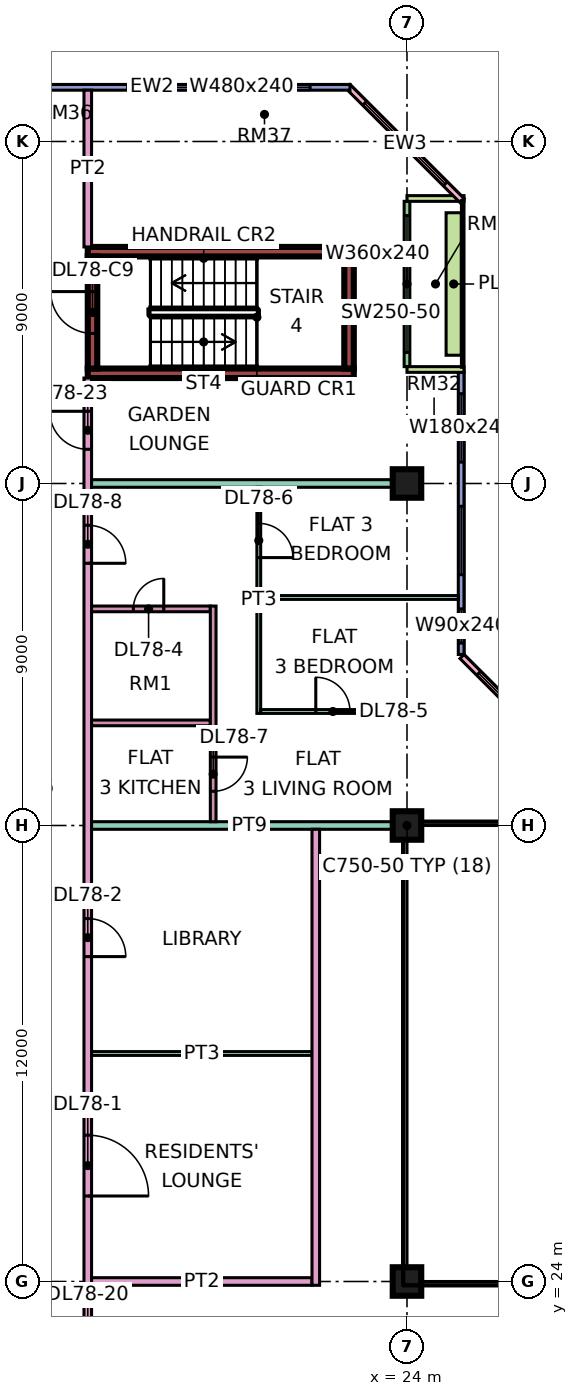
"""IFC4 building model, lengths in metres.
Left out: names, types, materials, properties, quantities, classifications, styles, units other than length and angle.
Written with IfcOpenShell. Run it as: python <this file> out.ifc"""

import sys

from ifc_helpers import new_model, si_unit, direction, frame, frame_2d, origin, origin_2d, place, context, subcontext, project, spatial, rectangle, extrude, element, fill, save


model = new_model("IFC4")
c1 = context("Model", 3, precision=1e-05, world=origin(), true_north=direction((0.0, 1.0)))
c2 = subcontext(c1, "Body", "Model", "MODEL_VIEW")
j1 = project(units=[si_unit("LENGTHUNIT", "METRE"), si_unit("PLANEANGLEUNIT", "RADIAN")], contexts=[c1])
p1 = place(None, origin())
s1 = spatial("IfcSite", under=j1, at=p1, CompositionType="ELEMENT")
p2 = place(p1, origin())
s2 = spatial("IfcBuilding", under=s1, at=p2, CompositionType="ELEMENT")
p3 = place(p2, frame((0.0, 0.0, 338.9)))
s3 = spatial("IfcBuildingStorey", under=s2, at=p3, CompositionType="ELEMENT", Elevation=338.9)
for number, where, z_axis, x_axis in (
    (1, (24.0, 24.0, 0.0), (0.0, 0.0, 1.0), (1.0, 0.0, 0.0)),
    (2, (24.0, 36.0, 0.0), (0.0, 0.0, 1.0), (1.0, 0.0, 0.0)),
    (3, (24.0, 45.0, 0.0), (0.0, 0.0, 1.0), (1.0, 0.0, 0.0)),
):
    element("IfcColumn", number, at=place(p3, frame(where, z_axis=z_axis, x_axis=x_axis)), inside=s3, PredefinedType="COLUMN", context=c2, shape_type="SweptSolid", body=[
        extrude(rectangle(XDim=0.75, YDim=0.75, at=origin_2d()), origin(), (0.0, 0.0, 1.0), 3.75),
    ])
for number, where, z_axis, x_axis in (
    (4, (15.6, 47.9, 0.0), (0.0, 0.0, 1.0), (1.0, 0.0, 0.0)),
    (5, (15.6, 51.1, 0.0), (0.0, 0.0, 1.0), (1.0, 0.0, 0.0)),
):
    element("IfcWall", number, at=place(p3, frame(where, z_axis=z_axis, x_axis=x_axis)), inside=s3, PredefinedType="SHEAR", context=c2, shape_type="SweptSolid", body=[
        extrude(rectangle(XDim=7.0, YDim=0.25, at=frame_2d((3.5, 0.0))), origin(), (0.0, 0.0, 1.0), 3.75),
    ])
p4 = place(p3, frame((15.725, 48.025, 0.0), z_axis=(0.0, 0.0, 1.0), x_axis=(0.0, 1.0, 0.0)))
e6 = element("IfcWall", 6, at=p4, inside=s3, PredefinedType="SHEAR", context=c2, shape_type="SweptSolid", body=[
    extrude(rectangle(XDim=2.95, YDim=0.25, at=frame_2d((1.475, 0.0))), origin(), (0.0, 0.0, 1.0), 3.75),
])
p5 = place(p4, frame((0.925, 0.0, 0.0)))
e7 = element("IfcOpeningElement", 7, at=p5, cuts=e6, PredefinedType="OPENING", context=c2, shape_type="SweptSolid", body=[
    extrude(rectangle(XDim=1.1, YDim=2.2, at=frame_2d((0.55, 1.1))), frame((0.0, 0.135, 0.0), z_axis=(0.0, -1.0, 0.0), x_axis=(1.0, 0.0, 0.0)), (0.0, 0.0, 1.0), 0.27),
])
p6 = place(p3, frame((22.475, 48.025, 0.0), z_axis=(0.0, 0.0, 1.0), x_axis=(0.0, 1.0, 0.0)))
e8 = element("IfcWall", 8, at=p6, inside=s3, PredefinedType="SHEAR", context=c2, shape_type="SweptSolid", body=[
    extrude(rectangle(XDim=2.95, YDim=0.25, at=frame_2d((1.475, 0.0))), origin(), (0.0, 0.0, 1.0), 3.75),
])
p7 = place(p3, frame((28.447, 37.447, 0.0), z_axis=(0.0, 0.0, 1.0), x_axis=(-0.707106781187, 0.707106781187, 0.0)))
e9 = element("IfcWall", 9, at=p7, inside=s3, PredefinedType="SOLIDWALL", context=c2, shape_type="SweptSolid", body=[
    extrude(rectangle(XDim=4.243, YDim=0.15, at=frame_2d((2.121, 0.0))), origin(), (0.0, 0.0, 1.0), 3.35),
])
p8 = place(p7, frame((0.621, 0.0, 0.45)))
e10 = element("IfcOpeningElement", 10, at=p8, cuts=e9, PredefinedType="OPENING", context=c2, shape_type="SweptSolid", body=[
    extrude(rectangle(XDim=3.0, YDim=2.4, at=frame_2d((1.5, 1.2))), frame((0.0, 0.085, 0.0), z_axis=(0.0, -1.0, 0.0), x_axis=(1.0, 0.0, 0.0)), (0.0, 0.0, 1.0), 0.17),
])
p9 = place(p3, frame((25.425, 40.5, 0.0), z_axis=(0.0, 0.0, 1.0), x_axis=(0.0, 1.0, 0.0)))
e11 = element("IfcWall", 11, at=p9, inside=s3, PredefinedType="SOLIDWALL", context=c2, shape_type="SweptSolid", body=[
    extrude(rectangle(XDim=7.425, YDim=0.15, at=frame_2d((3.712, 0.0))), origin(), (0.0, 0.0, 1.0), 3.35),
])
p10 = place(p9, frame((0.3, 0.0, 0.45)))
e12 = element("IfcOpeningElement", 12, at=p10, cuts=e11, PredefinedType="OPENING", context=c2, shape_type="SweptSolid", body=[
    extrude(rectangle(XDim=0.9, YDim=2.4, at=frame_2d((0.45, 1.2))), frame((0.0, 0.085, 0.0), z_axis=(0.0, -1.0, 0.0), x_axis=(1.0, 0.0, 0.0)), (0.0, 0.0, 1.0), 0.17),
])
p11 = place(p9, frame((2.1, 0.0, 0.45)))
e13 = element("IfcOpeningElement", 13, at=p11, cuts=e11, PredefinedType="OPENING", context=c2, shape_type="SweptSolid", body=[
    extrude(rectangle(XDim=1.8, YDim=2.4, at=frame_2d((0.9, 1.2))), frame((0.0, 0.085, 0.0), z_axis=(0.0, -1.0, 0.0), x_axis=(1.0, 0.0, 0.0)), (0.0, 0.0, 1.0), 0.17),
])
p12 = place(p9, frame((5.062, 0.0, 0.45)))
e14 = element("IfcOpeningElement", 14, at=p12, cuts=e11, PredefinedType="OPENING", context=c2, shape_type="SweptSolid", body=[
    extrude(rectangle(XDim=1.8, YDim=2.4, at=frame_2d((0.9, 1.2))), frame((0.0, 0.085, 0.0), z_axis=(0.0, -1.0, 0.0), x_axis=(1.0, 0.0, 0.0)), (0.0, 0.0, 1.0), 0.17),
])
p13 = place(p3, frame((24.0, 48.075, 0.0), z_axis=(0.0, 0.0, 1.0), x_axis=(0.0, 1.0, 0.0)))
e15 = element("IfcWall", 15, at=p13, inside=s3, PredefinedType="SOLIDWALL", context=c2, shape_type="SweptSolid", body=[
    extrude(rectangle(XDim=4.35, YDim=0.15, at=frame_2d((2.175, 0.0))), origin(), (0.0, 0.0, 1.0), 3.35),
])
p14 = place(p13, frame((0.375, 0.0, 0.45)))
e16 = element("IfcOpeningElement", 16, at=p14, cuts=e15, PredefinedType="OPENING", context=c2, shape_type="SweptSolid", body=[
    extrude(rectangle(XDim=3.6, YDim=2.4, at=frame_2d((1.8, 1.2))), frame((0.0, 0.085, 0.0), z_axis=(0.0, -1.0, 0.0), x_axis=(1.0, 0.0, 0.0)), (0.0, 0.0, 1.0), 0.17),
])
for number, where, z_axis, x_axis in (
    (17, (25.5, 48.0, 0.0), (0.0, 0.0, 1.0), (-1.0, 0.0, 0.0)),
    (18, (25.5, 52.5, 0.0), (0.0, 0.0, 1.0), (-1.0, 0.0, 0.0)),
):
    element("IfcWall", number, at=place(p3, frame(where, z_axis=z_axis, x_axis=x_axis)), inside=s3, PredefinedType="SOLIDWALL", context=c2, shape_type="SweptSolid", body=[
        extrude(rectangle(XDim=1.5, YDim=0.15, at=frame_2d((0.75, 0.0))), origin(), (0.0, 0.0, 1.0), 3.35),
    ])
p15 = place(p3, frame((25.447, 52.447, 0.0), z_axis=(0.0, 0.0, 1.0), x_axis=(-0.707106781187, 0.707106781187, 0.0)))
e19 = element("IfcWall", 19, at=p15, inside=s3, PredefinedType="SOLIDWALL", context=c2, shape_type="SweptSolid", body=[
    extrude(rectangle(XDim=4.243, YDim=0.15, at=frame_2d((2.121, 0.0))), origin(), (0.0, 0.0, 1.0), 3.35),
])
p16 = place(p15, frame((0.621, 0.0, 0.45)))
e20 = element("IfcOpeningElement", 20, at=p16, cuts=e19, PredefinedType="OPENING", context=c2, shape_type="SweptSolid", body=[
    extrude(rectangle(XDim=3.0, YDim=2.4, at=frame_2d((1.5, 1.2))), frame((0.0, 0.085, 0.0), z_axis=(0.0, -1.0, 0.0), x_axis=(1.0, 0.0, 0.0)), (0.0, 0.0, 1.0), 0.17),
])
p17 = place(p3, frame((22.5, 55.425, 0.0), z_axis=(0.0, 0.0, 1.0), x_axis=(-1.0, 0.0, 0.0)))
e21 = element("IfcWall", 21, at=p17, inside=s3, PredefinedType="SOLIDWALL", context=c2, shape_type="SweptSolid", body=[
    extrude(rectangle(XDim=10.425, YDim=0.15, at=frame_2d((5.212, 0.0))), origin(), (0.0, 0.0, 1.0), 3.35),
])
p18 = place(p17, frame((1.05, 0.0, 0.45)))
e22 = element("IfcOpeningElement", 22, at=p18, cuts=e21, PredefinedType="OPENING", context=c2, shape_type="SweptSolid", body=[
    extrude(rectangle(XDim=4.8, YDim=2.4, at=frame_2d((2.4, 1.2))), frame((0.0, 0.085, 0.0), z_axis=(0.0, -1.0, 0.0), x_axis=(1.0, 0.0, 0.0)), (0.0, 0.0, 1.0), 0.17),
])
p19 = place(p3, frame((25.229, 48.375, 0.0), z_axis=(0.0, 0.0, 1.0), x_axis=(0.0, 1.0, 0.0)))
e23 = element("IfcWall", 23, at=p19, inside=s3, PredefinedType="SOLIDWALL", context=c2, shape_type="SweptSolid", body=[
    extrude(rectangle(XDim=3.75, YDim=0.4, at=frame_2d((1.875, 0.0))), origin(), (0.0, 0.0, 1.0), 0.7),
])
p20 = place(p3, frame((15.6, 20.0, 0.0), z_axis=(0.0, 0.0, 1.0), x_axis=(0.0, 1.0, 0.0)))
e24 = element("IfcWall", 24, at=p20, inside=s3, PredefinedType="PARTITIONING", context=c2, shape_type="SweptSolid", body=[
    extrude(rectangle(XDim=27.775, YDim=0.2, at=frame_2d((13.887, 0.0))), origin(), (0.0, 0.0, 1.0), 3.35),
])
p21 = place(p20, frame((6.25, 0.0, 0.0)))
e25 = element("IfcOpeningElement", 25, at=p21, cuts=e24, PredefinedType="OPENING", context=c2, shape_type="SweptSolid", body=[
    extrude(rectangle(XDim=1.6, YDim=2.1, at=frame_2d((0.8, 1.05))), frame((0.0, 0.11, 0.0), z_axis=(0.0, -1.0, 0.0), x_axis=(1.0, 0.0, 0.0)), (0.0, 0.0, 1.0), 0.22),
])
p22 = place(p20, frame((12.55, 0.0, 0.0)))
e26 = element("IfcOpeningElement", 26, at=p22, cuts=e24, PredefinedType="OPENING", context=c2, shape_type="SweptSolid", body=[
    extrude(rectangle(XDim=1.0, YDim=2.1, at=frame_2d((0.5, 1.05))), frame((0.0, 0.11, 0.0), z_axis=(0.0, -1.0, 0.0), x_axis=(1.0, 0.0, 0.0)), (0.0, 0.0, 1.0), 0.22),
])
p23 = place(p20, frame((22.9, 0.0, 0.0)))
e27 = element("IfcOpeningElement", 27, at=p23, cuts=e24, PredefinedType="OPENING", context=c2, shape_type="SweptSolid", body=[
    extrude(rectangle(XDim=1.0, YDim=2.1, at=frame_2d((0.5, 1.05))), frame((0.0, 0.11, 0.0), z_axis=(0.0, -1.0, 0.0), x_axis=(1.0, 0.0, 0.0)), (0.0, 0.0, 1.0), 0.22),
])
p24 = place(p20, frame((1.15, 0.0, 0.0)))
e28 = element("IfcOpeningElement", 28, at=p24, cuts=e24, PredefinedType="OPENING", context=c2, shape_type="SweptSolid", body=[
    extrude(rectangle(XDim=1.8, YDim=2.1, at=frame_2d((0.9, 1.05))), frame((0.0, 0.11, 0.0), z_axis=(0.0, -1.0, 0.0), x_axis=(1.0, 0.0, 0.0)), (0.0, 0.0, 1.0), 0.22),
])
p25 = place(p20, frame((25.9, 0.0, 0.0)))
e29 = element("IfcOpeningElement", 29, at=p25, cuts=e24, PredefinedType="OPENING", context=c2, shape_type="SweptSolid", body=[
    extrude(rectangle(XDim=1.0, YDim=2.1, at=frame_2d((0.5, 1.05))), frame((0.0, 0.11, 0.0), z_axis=(0.0, -1.0, 0.0), x_axis=(1.0, 0.0, 0.0)), (0.0, 0.0, 1.0), 0.22),
])
p26 = place(p3, frame((15.6, 51.225, 0.0), z_axis=(0.0, 0.0, 1.0), x_axis=(0.0, 1.0, 0.0)))
e30 = element("IfcWall", 30, at=p26, inside=s3, PredefinedType="PARTITIONING", context=c2, shape_type="SweptSolid", body=[
    extrude(rectangle(XDim=4.125, YDim=0.2, at=frame_2d((2.062, 0.0))), origin(), (0.0, 0.0, 1.0), 3.35),
])
p27 = place(p3, frame((15.7, 24.0, 0.0), z_axis=(0.0, 0.0, 1.0), x_axis=(1.0, 0.0, 0.0)))
e31 = element("IfcWall", 31, at=p27, inside=s3, PredefinedType="PARTITIONING", context=c2, shape_type="SweptSolid", body=[
    extrude(rectangle(XDim=5.8, YDim=0.2, at=frame_2d((2.9, 0.0))), origin(), (0.0, 0.0, 1.0), 3.35),
])
p28 = place(p3, frame((15.7, 30.0, 0.0), z_axis=(0.0, 0.0, 1.0), x_axis=(1.0, 0.0, 0.0)))
e32 = element("IfcWall", 32, at=p28, inside=s3, PredefinedType="PARTITIONING", context=c2, shape_type="SweptSolid", body=[
    extrude(rectangle(XDim=5.8, YDim=0.1, at=frame_2d((2.9, 0.0))), origin(), (0.0, 0.0, 1.0), 3.35),
])
p29 = place(p3, frame((15.7, 36.0, 0.0), z_axis=(0.0, 0.0, 1.0), x_axis=(1.0, 0.0, 0.0)))
e33 = element("IfcWall", 33, at=p29, inside=s3, PredefinedType="PARTITIONING", context=c2, shape_type="SweptSolid", body=[
    extrude(rectangle(XDim=8.3, YDim=0.2, at=frame_2d((4.15, 0.0))), origin(), (0.0, 0.0, 1.0), 3.35),
])
p30 = place(p3, frame((15.7, 38.7, 0.0), z_axis=(0.0, 0.0, 1.0), x_axis=(1.0, 0.0, 0.0)))
e34 = element("IfcWall", 34, at=p30, inside=s3, PredefinedType="PARTITIONING", context=c2, shape_type="SweptSolid", body=[
    extrude(rectangle(XDim=3.125, YDim=0.15, at=frame_2d((1.562, 0.0))), origin(), (0.0, 0.0, 1.0), 3.35),
])
p31 = place(p3, frame((15.7, 41.7, 0.0), z_axis=(0.0, 0.0, 1.0), x_axis=(1.0, 0.0, 0.0)))
e35 = element("IfcWall", 35, at=p31, inside=s3, PredefinedType="PARTITIONING", context=c2, shape_type="SweptSolid", body=[
    extrude(rectangle(XDim=3.125, YDim=0.15, at=frame_2d((1.562, 0.0))), origin(), (0.0, 0.0, 1.0), 3.35),
])
p32 = place(p31, frame((1.1, 0.0, 0.0)))
e36 = element("IfcOpeningElement", 36, at=p32, cuts=e35, PredefinedType="OPENING", context=c2, shape_type="SweptSolid", body=[
    extrude(rectangle(XDim=0.8, YDim=2.1, at=frame_2d((0.4, 1.05))), frame((0.0, 0.085, 0.0), z_axis=(0.0, -1.0, 0.0), x_axis=(1.0, 0.0, 0.0)), (0.0, 0.0, 1.0), 0.17),
])
p33 = place(p3, frame((15.7, 45.0, 0.0), z_axis=(0.0, 0.0, 1.0), x_axis=(1.0, 0.0, 0.0)))
e37 = element("IfcWall", 37, at=p33, inside=s3, PredefinedType="PARTITIONING", context=c2, shape_type="SweptSolid", body=[
    extrude(rectangle(XDim=8.3, YDim=0.2, at=frame_2d((4.15, 0.0))), origin(), (0.0, 0.0, 1.0), 3.35),
])
p34 = place(p3, frame((18.9, 36.1, 0.0), z_axis=(0.0, 0.0, 1.0), x_axis=(0.0, 1.0, 0.0)))
e38 = element("IfcWall", 38, at=p34, inside=s3, PredefinedType="PARTITIONING", context=c2, shape_type="SweptSolid", body=[
    extrude(rectangle(XDim=5.675, YDim=0.15, at=frame_2d((2.837, 0.0))), origin(), (0.0, 0.0, 1.0), 3.35),
])
p35 = place(p34, frame((0.8, 0.0, 0.0)))
e39 = element("IfcOpeningElement", 39, at=p35, cuts=e38, PredefinedType="OPENING", context=c2, shape_type="SweptSolid", body=[
    extrude(rectangle(XDim=0.9, YDim=2.1, at=frame_2d((0.45, 1.05))), frame((0.0, 0.085, 0.0), z_axis=(0.0, -1.0, 0.0), x_axis=(1.0, 0.0, 0.0)), (0.0, 0.0, 1.0), 0.17),
])
p36 = place(p3, frame((20.1, 38.95, 0.0), z_axis=(0.0, 0.0, 1.0), x_axis=(0.0, 1.0, 0.0)))
e40 = element("IfcWall", 40, at=p36, inside=s3, PredefinedType="PARTITIONING", context=c2, shape_type="SweptSolid", body=[
    extrude(rectangle(XDim=5.95, YDim=0.1, at=frame_2d((2.975, 0.0))), origin(), (0.0, 0.0, 1.0), 3.35),
])
p37 = place(p36, frame((4.1, 0.0, 0.0)))
e41 = element("IfcOpeningElement", 41, at=p37, cuts=e40, PredefinedType="OPENING", context=c2, shape_type="SweptSolid", body=[
    extrude(rectangle(XDim=0.9, YDim=2.1, at=frame_2d((0.45, 1.05))), frame((0.0, 0.06, 0.0), z_axis=(0.0, -1.0, 0.0), x_axis=(1.0, 0.0, 0.0)), (0.0, 0.0, 1.0), 0.12),
])
p38 = place(p3, frame((20.15, 39.0, 0.0), z_axis=(0.0, 0.0, 1.0), x_axis=(1.0, 0.0, 0.0)))
e42 = element("IfcWall", 42, at=p38, inside=s3, PredefinedType="PARTITIONING", context=c2, shape_type="SweptSolid", body=[
    extrude(rectangle(XDim=3.85, YDim=0.1, at=frame_2d((1.925, 0.0))), origin(), (0.0, 0.0, 1.0), 3.35),
])
p39 = place(p38, frame((1.45, 0.0, 0.0)))
e43 = element("IfcOpeningElement", 43, at=p39, cuts=e42, PredefinedType="OPENING", context=c2, shape_type="SweptSolid", body=[
    extrude(rectangle(XDim=0.9, YDim=2.1, at=frame_2d((0.45, 1.05))), frame((0.0, 0.06, 0.0), z_axis=(0.0, -1.0, 0.0), x_axis=(1.0, 0.0, 0.0)), (0.0, 0.0, 1.0), 0.12),
])
p40 = place(p3, frame((20.15, 42.0, 0.0), z_axis=(0.0, 0.0, 1.0), x_axis=(1.0, 0.0, 0.0)))
e44 = element("IfcWall", 44, at=p40, inside=s3, PredefinedType="PARTITIONING", context=c2, shape_type="SweptSolid", body=[
    extrude(rectangle(XDim=5.201, YDim=0.1, at=frame_2d((2.601, 0.0))), origin(), (0.0, 0.0, 1.0), 3.35),
])
p41 = place(p3, frame((21.6, 23.9, 0.0), z_axis=(0.0, 0.0, 1.0), x_axis=(0.0, 1.0, 0.0)))
e45 = element("IfcWall", 45, at=p41, inside=s3, PredefinedType="PARTITIONING", context=c2, shape_type="SweptSolid", body=[
    extrude(rectangle(XDim=12.0, YDim=0.2, at=frame_2d((6.0, 0.0))), origin(), (0.0, 0.0, 1.0), 3.35),
])
p42 = place(p8, origin())
e46 = element("IfcWindow", 46, at=p42, inside=s3, PartitioningType="SINGLE_PANEL", PredefinedType="WINDOW", context=c2, shape_type="SweptSolid", body=[
    extrude(rectangle(XDim=3.0, YDim=2.4, at=frame_2d((1.5, 1.2))), frame((0.0, 0.03, 0.0), z_axis=(0.0, -1.0, 0.0), x_axis=(1.0, 0.0, 0.0)), (0.0, 0.0, 1.0), 0.06),
])
fill(e10, e46)
p43 = place(p10, origin())
e47 = element("IfcWindow", 47, at=p43, inside=s3, PartitioningType="SINGLE_PANEL", PredefinedType="WINDOW", context=c2, shape_type="SweptSolid", body=[
    extrude(rectangle(XDim=0.9, YDim=2.4, at=frame_2d((0.45, 1.2))), frame((0.0, 0.03, 0.0), z_axis=(0.0, -1.0, 0.0), x_axis=(1.0, 0.0, 0.0)), (0.0, 0.0, 1.0), 0.06),
])
fill(e12, e47)
p44 = place(p11, origin())
e48 = element("IfcWindow", 48, at=p44, inside=s3, PartitioningType="SINGLE_PANEL", PredefinedType="WINDOW", context=c2, shape_type="SweptSolid", body=[
    extrude(rectangle(XDim=1.8, YDim=2.4, at=frame_2d((0.9, 1.2))), frame((0.0, 0.03, 0.0), z_axis=(0.0, -1.0, 0.0), x_axis=(1.0, 0.0, 0.0)), (0.0, 0.0, 1.0), 0.06),
])
fill(e13, e48)
p45 = place(p12, origin())
e49 = element("IfcWindow", 49, at=p45, inside=s3, PartitioningType="SINGLE_PANEL", PredefinedType="WINDOW", context=c2, shape_type="SweptSolid", body=[
    extrude(rectangle(XDim=1.8, YDim=2.4, at=frame_2d((0.9, 1.2))), frame((0.0, 0.03, 0.0), z_axis=(0.0, -1.0, 0.0), x_axis=(1.0, 0.0, 0.0)), (0.0, 0.0, 1.0), 0.06),
])
fill(e14, e49)
p46 = place(p14, origin())
e50 = element("IfcWindow", 50, at=p46, inside=s3, PartitioningType="SINGLE_PANEL", PredefinedType="WINDOW", context=c2, shape_type="SweptSolid", body=[
    extrude(rectangle(XDim=3.6, YDim=2.4, at=frame_2d((1.8, 1.2))), frame((0.0, 0.03, 0.0), z_axis=(0.0, -1.0, 0.0), x_axis=(1.0, 0.0, 0.0)), (0.0, 0.0, 1.0), 0.06),
])
fill(e16, e50)
p47 = place(p16, origin())
e51 = element("IfcWindow", 51, at=p47, inside=s3, PartitioningType="SINGLE_PANEL", PredefinedType="WINDOW", context=c2, shape_type="SweptSolid", body=[
    extrude(rectangle(XDim=3.0, YDim=2.4, at=frame_2d((1.5, 1.2))), frame((0.0, 0.03, 0.0), z_axis=(0.0, -1.0, 0.0), x_axis=(1.0, 0.0, 0.0)), (0.0, 0.0, 1.0), 0.06),
])
fill(e20, e51)
p48 = place(p18, origin())
e52 = element("IfcWindow", 52, at=p48, inside=s3, PartitioningType="SINGLE_PANEL", PredefinedType="WINDOW", context=c2, shape_type="SweptSolid", body=[
    extrude(rectangle(XDim=4.8, YDim=2.4, at=frame_2d((2.4, 1.2))), frame((0.0, 0.03, 0.0), z_axis=(0.0, -1.0, 0.0), x_axis=(1.0, 0.0, 0.0)), (0.0, 0.0, 1.0), 0.06),
])
fill(e22, e52)
p49 = place(p5, frame((1.1, 0.0, 0.0), z_axis=(0.0, 0.0, 1.0), x_axis=(-1.0, 0.0, 0.0)))
e53 = element("IfcDoor", 53, at=p49, inside=s3, OperationType="SINGLE_SWING_RIGHT", PredefinedType="DOOR", context=c2, shape_type="SweptSolid", body=[
    extrude(rectangle(XDim=1.1, YDim=2.2, at=frame_2d((0.55, 1.1))), frame((0.0, 0.025, 0.0), z_axis=(0.0, -1.0, 0.0), x_axis=(1.0, 0.0, 0.0)), (0.0, 0.0, 1.0), 0.05),
])
fill(e7, e53)
p50 = place(p21, frame((1.6, 0.0, 0.0), z_axis=(0.0, 0.0, 1.0), x_axis=(-1.0, 0.0, 0.0)))
e54 = element("IfcDoor", 54, at=p50, inside=s3, OperationType="DOUBLE_DOOR_SINGLE_SWING", PredefinedType="DOOR", context=c2, shape_type="SweptSolid", body=[
    extrude(rectangle(XDim=1.6, YDim=2.1, at=frame_2d((0.8, 1.05))), frame((0.0, 0.025, 0.0), z_axis=(0.0, -1.0, 0.0), x_axis=(1.0, 0.0, 0.0)), (0.0, 0.0, 1.0), 0.05),
])
fill(e25, e54)
p51 = place(p22, frame((1.0, 0.0, 0.0), z_axis=(0.0, 0.0, 1.0), x_axis=(-1.0, 0.0, 0.0)))
e55 = element("IfcDoor", 55, at=p51, inside=s3, OperationType="SINGLE_SWING_LEFT", PredefinedType="DOOR", context=c2, shape_type="SweptSolid", body=[
    extrude(rectangle(XDim=1.0, YDim=2.1, at=frame_2d((0.5, 1.05))), frame((0.0, 0.025, 0.0), z_axis=(0.0, -1.0, 0.0), x_axis=(1.0, 0.0, 0.0)), (0.0, 0.0, 1.0), 0.05),
])
fill(e26, e55)
p52 = place(p32, frame((0.8, 0.0, 0.0), z_axis=(0.0, 0.0, 1.0), x_axis=(-1.0, 0.0, 0.0)))
e56 = element("IfcDoor", 56, at=p52, inside=s3, OperationType="SINGLE_SWING_RIGHT", PredefinedType="DOOR", context=c2, shape_type="SweptSolid", body=[
    extrude(rectangle(XDim=0.8, YDim=2.1, at=frame_2d((0.4, 1.05))), frame((0.0, 0.025, 0.0), z_axis=(0.0, -1.0, 0.0), x_axis=(1.0, 0.0, 0.0)), (0.0, 0.0, 1.0), 0.05),
])
fill(e36, e56)
p53 = place(p39, origin())
e57 = element("IfcDoor", 57, at=p53, inside=s3, OperationType="SINGLE_SWING_LEFT", PredefinedType="DOOR", context=c2, shape_type="SweptSolid", body=[
    extrude(rectangle(XDim=0.9, YDim=2.1, at=frame_2d((0.45, 1.05))), frame((0.0, 0.025, 0.0), z_axis=(0.0, -1.0, 0.0), x_axis=(1.0, 0.0, 0.0)), (0.0, 0.0, 1.0), 0.05),
])
fill(e43, e57)
p54 = place(p37, frame((0.9, 0.0, 0.0), z_axis=(0.0, 0.0, 1.0), x_axis=(-1.0, 0.0, 0.0)))
e58 = element("IfcDoor", 58, at=p54, inside=s3, OperationType="SINGLE_SWING_LEFT", PredefinedType="DOOR", context=c2, shape_type="SweptSolid", body=[
    extrude(rectangle(XDim=0.9, YDim=2.1, at=frame_2d((0.45, 1.05))), frame((0.0, 0.025, 0.0), z_axis=(0.0, -1.0, 0.0), x_axis=(1.0, 0.0, 0.0)), (0.0, 0.0, 1.0), 0.05),
])
fill(e41, e58)
p55 = place(p35, origin())
e59 = element("IfcDoor", 59, at=p55, inside=s3, OperationType="SINGLE_SWING_RIGHT", PredefinedType="DOOR", context=c2, shape_type="SweptSolid", body=[
    extrude(rectangle(XDim=0.9, YDim=2.1, at=frame_2d((0.45, 1.05))), frame((0.0, 0.025, 0.0), z_axis=(0.0, -1.0, 0.0), x_axis=(1.0, 0.0, 0.0)), (0.0, 0.0, 1.0), 0.05),
])
fill(e39, e59)
p56 = place(p23, frame((1.0, 0.0, 0.0), z_axis=(0.0, 0.0, 1.0), x_axis=(-1.0, 0.0, 0.0)))
e60 = element("IfcDoor", 60, at=p56, inside=s3, OperationType="SINGLE_SWING_LEFT", PredefinedType="DOOR", context=c2, shape_type="SweptSolid", body=[
    extrude(rectangle(XDim=1.0, YDim=2.1, at=frame_2d((0.5, 1.05))), frame((0.0, 0.025, 0.0), z_axis=(0.0, -1.0, 0.0), x_axis=(1.0, 0.0, 0.0)), (0.0, 0.0, 1.0), 0.05),
])
fill(e27, e60)
p57 = place(p25, frame((1.0, 0.0, 0.0), z_axis=(0.0, 0.0, 1.0), x_axis=(-1.0, 0.0, 0.0)))
e61 = element("IfcDoor", 61, at=p57, inside=s3, OperationType="SINGLE_SWING_RIGHT", PredefinedType="DOOR", context=c2, shape_type="SweptSolid", body=[
    extrude(rectangle(XDim=1.0, YDim=2.1, at=frame_2d((0.5, 1.05))), frame((0.0, 0.025, 0.0), z_axis=(0.0, -1.0, 0.0), x_axis=(1.0, 0.0, 0.0)), (0.0, 0.0, 1.0), 0.05),
])
fill(e29, e61)
save(model, sys.argv[1])
